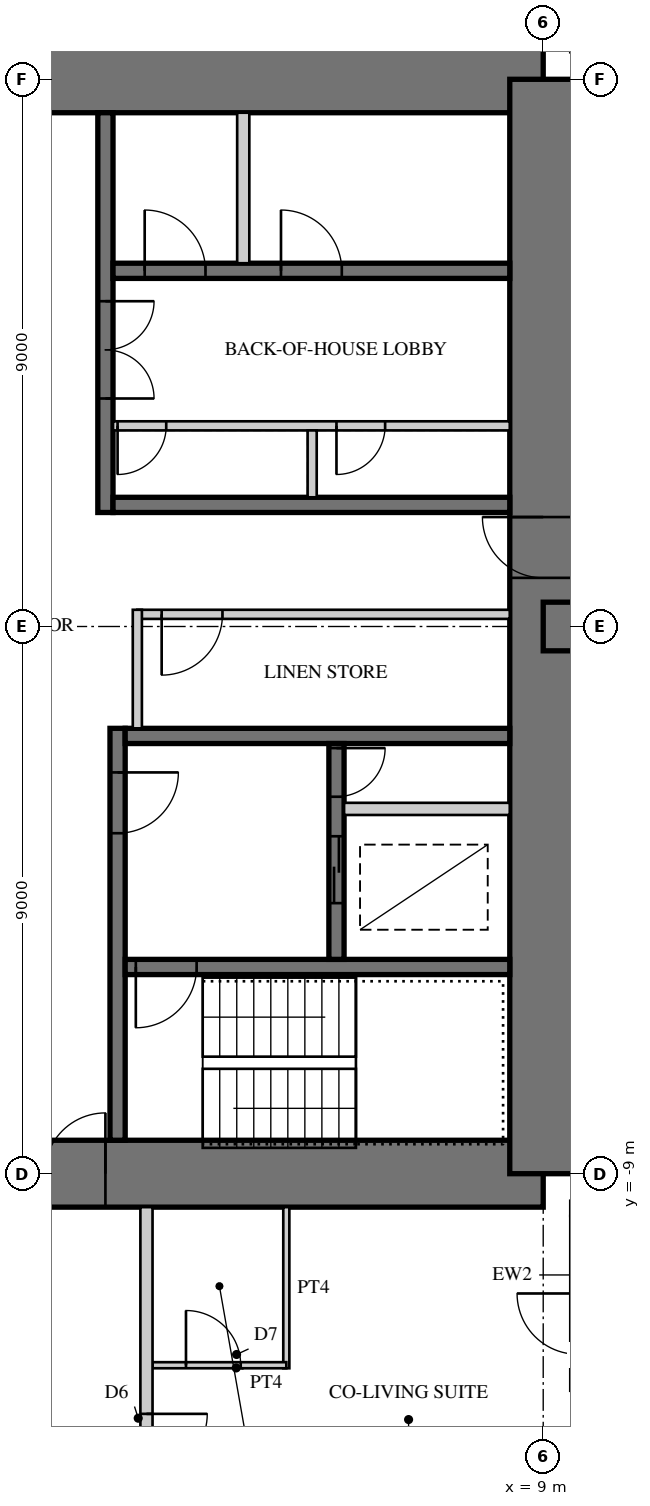
"""IFC4 building model, lengths in metres.
Left out: names, types, materials, properties, quantities, classifications, styles, units other than length and angle.
Written with IfcOpenShell. Run it as: python <this file> out.ifc"""

import sys

from ifc_helpers import new_model, si_unit, direction, frame, frame_2d, origin, place, context, subcontext, project, spatial, rectangle, extrude, element, fill, save


model = new_model("IFC4")
c1 = context("Model", 3, precision=1e-05, world=origin(), true_north=direction((0.0, 1.0)))
c2 = subcontext(c1, "Body", "Model", "MODEL_VIEW")
j1 = project(units=[si_unit("LENGTHUNIT", "METRE"), si_unit("PLANEANGLEUNIT", "RADIAN")], contexts=[c1])
p1 = place(None, origin())
s1 = spatial("IfcSite", under=j1, at=p1, CompositionType="ELEMENT")
p2 = place(p1, origin())
s2 = spatial("IfcBuilding", under=s1, at=p2, CompositionType="ELEMENT")
p3 = place(p2, frame((0.0, 0.0, 200.1)))
s3 = spatial("IfcBuildingStorey", under=s2, at=p3, CompositionType="ELEMENT", Elevation=200.1)
p4 = place(p3, frame((9.0, 9.0, 0.0), z_axis=(0.0, 0.0, 1.0), x_axis=(-1.0, 0.0, 0.0)))
e1 = element("IfcWall", 1, at=p4, inside=s3, PredefinedType="SHEAR", context=c2, shape_type="SweptSolid", body=[
    extrude(rectangle(XDim=18.0, YDim=1.1, at=frame_2d((9.0, 0.0))), origin(), (0.0, 0.0, 1.0), 3.4),
])
p5 = place(p4, frame((9.8, 0.0, 0.0)))
e2 = element("IfcOpeningElement", 2, at=p5, cuts=e1, PredefinedType="OPENING", context=c2, shape_type="SweptSolid", body=[
    extrude(rectangle(XDim=1.0, YDim=2.4, at=frame_2d((0.5, 1.2))), frame((0.0, 0.56, 0.0), z_axis=(0.0, -1.0, 0.0), x_axis=(1.0, 0.0, 0.0)), (0.0, 0.0, 1.0), 1.12),
])
p6 = place(p3, frame((-9.0, -9.0, 0.0), z_axis=(0.0, 0.0, 1.0), x_axis=(1.0, 0.0, 0.0)))
e3 = element("IfcWall", 3, at=p6, inside=s3, PredefinedType="SHEAR", context=c2, shape_type="SweptSolid", body=[
    extrude(rectangle(XDim=18.0, YDim=1.1, at=frame_2d((9.0, 0.0))), origin(), (0.0, 0.0, 1.0), 3.4),
])
p7 = place(p6, frame((9.8, 0.0, 0.0)))
e4 = element("IfcOpeningElement", 4, at=p7, cuts=e3, PredefinedType="OPENING", context=c2, shape_type="SweptSolid", body=[
    extrude(rectangle(XDim=1.0, YDim=2.4, at=frame_2d((0.5, 1.2))), frame((0.0, 0.56, 0.0), z_axis=(0.0, -1.0, 0.0), x_axis=(1.0, 0.0, 0.0)), (0.0, 0.0, 1.0), 1.12),
])
p8 = place(p3, frame((9.0, -9.0, 0.0), z_axis=(0.0, 0.0, 1.0), x_axis=(0.0, 1.0, 0.0)))
e5 = element("IfcWall", 5, at=p8, inside=s3, PredefinedType="SHEAR", context=c2, shape_type="SweptSolid", body=[
    extrude(rectangle(XDim=18.0, YDim=1.1, at=frame_2d((9.0, 0.0))), origin(), (0.0, 0.0, 1.0), 3.4),
])
p9 = place(p8, frame((9.8, 0.0, 0.0)))
e6 = element("IfcOpeningElement", 6, at=p9, cuts=e5, PredefinedType="OPENING", context=c2, shape_type="SweptSolid", body=[
    extrude(rectangle(XDim=1.0, YDim=2.4, at=frame_2d((0.5, 1.2))), frame((0.0, 0.56, 0.0), z_axis=(0.0, -1.0, 0.0), x_axis=(1.0, 0.0, 0.0)), (0.0, 0.0, 1.0), 1.12),
])
p10 = place(p3, frame((1.8, 1.875, 0.0), z_axis=(0.0, 0.0, 1.0), x_axis=(0.0, 1.0, 0.0)))
e7 = element("IfcWall", 7, at=p10, inside=s3, PredefinedType="SHEAR", context=c2, shape_type="SweptSolid", body=[
    extrude(rectangle(XDim=6.575, YDim=0.25, at=frame_2d((3.288, 0.0))), origin(), (0.0, 0.0, 1.0), 3.4),
])
p11 = place(p10, frame((1.875, 0.0, 0.0)))
e8 = element("IfcOpeningElement", 8, at=p11, cuts=e7, PredefinedType="OPENING", context=c2, shape_type="SweptSolid", body=[
    extrude(rectangle(XDim=1.6, YDim=2.4, at=frame_2d((0.8, 1.2))), frame((0.0, 0.135, 0.0), z_axis=(0.0, -1.0, 0.0), x_axis=(1.0, 0.0, 0.0)), (0.0, 0.0, 1.0), 0.27),
])
p12 = place(p3, frame((1.925, 2.0, 0.0), z_axis=(0.0, 0.0, 1.0), x_axis=(1.0, 0.0, 0.0)))
e9 = element("IfcWall", 9, at=p12, inside=s3, PredefinedType="SHEAR", context=c2, shape_type="SweptSolid", body=[
    extrude(rectangle(XDim=6.525, YDim=0.25, at=frame_2d((3.262, 0.0))), origin(), (0.0, 0.0, 1.0), 3.4),
])
p13 = place(p3, frame((1.925, 5.85, 0.0), z_axis=(0.0, 0.0, 1.0), x_axis=(1.0, 0.0, 0.0)))
e10 = element("IfcWall", 10, at=p13, inside=s3, PredefinedType="SHEAR", context=c2, shape_type="SweptSolid", body=[
    extrude(rectangle(XDim=6.525, YDim=0.25, at=frame_2d((3.262, 0.0))), origin(), (0.0, 0.0, 1.0), 3.4),
])
p14 = place(p13, frame((0.521, 0.0, 0.0)))
e11 = element("IfcOpeningElement", 11, at=p14, cuts=e10, PredefinedType="OPENING", context=c2, shape_type="SweptSolid", body=[
    extrude(rectangle(XDim=1.0, YDim=2.1, at=frame_2d((0.5, 1.05))), frame((0.0, 0.135, 0.0), z_axis=(0.0, -1.0, 0.0), x_axis=(1.0, 0.0, 0.0)), (0.0, 0.0, 1.0), 0.27),
])
p15 = place(p13, frame((2.762, 0.0, 0.0)))
e12 = element("IfcOpeningElement", 12, at=p15, cuts=e10, PredefinedType="OPENING", context=c2, shape_type="SweptSolid", body=[
    extrude(rectangle(XDim=1.0, YDim=2.1, at=frame_2d((0.5, 1.05))), frame((0.0, 0.135, 0.0), z_axis=(0.0, -1.0, 0.0), x_axis=(1.0, 0.0, 0.0)), (0.0, 0.0, 1.0), 0.27),
])
p16 = place(p3, frame((1.925, 3.3, 0.0), z_axis=(0.0, 0.0, 1.0), x_axis=(1.0, 0.0, 0.0)))
e13 = element("IfcWall", 13, at=p16, inside=s3, PredefinedType="PARTITIONING", context=c2, shape_type="SweptSolid", body=[
    extrude(rectangle(XDim=6.525, YDim=0.15, at=frame_2d((3.262, 0.0))), origin(), (0.0, 0.0, 1.0), 3.4),
])
p17 = place(p16, frame((0.075, 0.0, 0.0)))
e14 = element("IfcOpeningElement", 14, at=p17, cuts=e13, PredefinedType="OPENING", context=c2, shape_type="SweptSolid", body=[
    extrude(rectangle(XDim=0.8, YDim=2.1, at=frame_2d((0.4, 1.05))), frame((0.0, 0.085, 0.0), z_axis=(0.0, -1.0, 0.0), x_axis=(1.0, 0.0, 0.0)), (0.0, 0.0, 1.0), 0.17),
])
p18 = place(p16, frame((3.675, 0.0, 0.0)))
e15 = element("IfcOpeningElement", 15, at=p18, cuts=e13, PredefinedType="OPENING", context=c2, shape_type="SweptSolid", body=[
    extrude(rectangle(XDim=0.8, YDim=2.1, at=frame_2d((0.4, 1.05))), frame((0.0, 0.085, 0.0), z_axis=(0.0, -1.0, 0.0), x_axis=(1.0, 0.0, 0.0)), (0.0, 0.0, 1.0), 0.17),
])
p19 = place(p3, frame((5.2, 2.125, 0.0), z_axis=(0.0, 0.0, 1.0), x_axis=(0.0, 1.0, 0.0)))
e16 = element("IfcWall", 16, at=p19, inside=s3, PredefinedType="PARTITIONING", context=c2, shape_type="SweptSolid", body=[
    extrude(rectangle(XDim=1.1, YDim=0.15, at=frame_2d((0.55, 0.0))), origin(), (0.0, 0.0, 1.0), 3.4),
])
p20 = place(p3, frame((4.067, 5.975, 0.0), z_axis=(0.0, 0.0, 1.0), x_axis=(0.0, 1.0, 0.0)))
e17 = element("IfcWall", 17, at=p20, inside=s3, PredefinedType="PARTITIONING", context=c2, shape_type="SweptSolid", body=[
    extrude(rectangle(XDim=2.475, YDim=0.2, at=frame_2d((1.237, 0.0))), origin(), (0.0, 0.0, 1.0), 3.4),
])
p21 = place(p3, frame((2.0, -1.675, 0.0), z_axis=(0.0, 0.0, 1.0), x_axis=(0.0, -1.0, 0.0)))
e18 = element("IfcWall", 18, at=p21, inside=s3, PredefinedType="SHEAR", context=c2, shape_type="SweptSolid", body=[
    extrude(rectangle(XDim=6.775, YDim=0.25, at=frame_2d((3.387, 0.0))), origin(), (0.0, 0.0, 1.0), 3.4),
])
p22 = place(p21, frame((0.725, 0.0, 0.0)))
e19 = element("IfcOpeningElement", 19, at=p22, cuts=e18, PredefinedType="OPENING", context=c2, shape_type="SweptSolid", body=[
    extrude(rectangle(XDim=1.0, YDim=2.1, at=frame_2d((0.5, 1.05))), frame((0.0, 0.135, 0.0), z_axis=(0.0, -1.0, 0.0), x_axis=(1.0, 0.0, 0.0)), (0.0, 0.0, 1.0), 0.27),
])
p23 = place(p3, frame((2.125, -1.8, 0.0), z_axis=(0.0, 0.0, 1.0), x_axis=(1.0, 0.0, 0.0)))
e20 = element("IfcWall", 20, at=p23, inside=s3, PredefinedType="SHEAR", context=c2, shape_type="SweptSolid", body=[
    extrude(rectangle(XDim=6.325, YDim=0.25, at=frame_2d((3.163, 0.0))), origin(), (0.0, 0.0, 1.0), 3.4),
])
p24 = place(p3, frame((2.125, -5.6, 0.0), z_axis=(0.0, 0.0, 1.0), x_axis=(1.0, 0.0, 0.0)))
e21 = element("IfcWall", 21, at=p24, inside=s3, PredefinedType="SHEAR", context=c2, shape_type="SweptSolid", body=[
    extrude(rectangle(XDim=6.325, YDim=0.25, at=frame_2d((3.163, 0.0))), origin(), (0.0, 0.0, 1.0), 3.4),
])
p25 = place(p24, frame((0.175, 0.0, 0.0)))
e22 = element("IfcOpeningElement", 22, at=p25, cuts=e21, PredefinedType="OPENING", context=c2, shape_type="SweptSolid", body=[
    extrude(rectangle(XDim=1.0, YDim=2.1, at=frame_2d((0.5, 1.05))), frame((0.0, 0.135, 0.0), z_axis=(0.0, -1.0, 0.0), x_axis=(1.0, 0.0, 0.0)), (0.0, 0.0, 1.0), 0.27),
])
p26 = place(p3, frame((5.6, -1.925, 0.0), z_axis=(0.0, 0.0, 1.0), x_axis=(0.0, -1.0, 0.0)))
e23 = element("IfcWall", 23, at=p26, inside=s3, PredefinedType="SHEAR", context=c2, shape_type="SweptSolid", body=[
    extrude(rectangle(XDim=3.55, YDim=0.25, at=frame_2d((1.775, 0.0))), origin(), (0.0, 0.0, 1.0), 3.4),
])
p27 = place(p26, frame((1.525, 0.0, 0.0)))
e24 = element("IfcOpeningElement", 24, at=p27, cuts=e23, PredefinedType="OPENING", context=c2, shape_type="SweptSolid", body=[
    extrude(rectangle(XDim=1.1, YDim=2.2, at=frame_2d((0.55, 1.1))), frame((0.0, 0.135, 0.0), z_axis=(0.0, -1.0, 0.0), x_axis=(1.0, 0.0, 0.0)), (0.0, 0.0, 1.0), 0.27),
])
p28 = place(p26, frame((0.075, 0.0, 0.0)))
e25 = element("IfcOpeningElement", 25, at=p28, cuts=e23, PredefinedType="OPENING", context=c2, shape_type="SweptSolid", body=[
    extrude(rectangle(XDim=0.8, YDim=2.1, at=frame_2d((0.4, 1.05))), frame((0.0, 0.135, 0.0), z_axis=(0.0, -1.0, 0.0), x_axis=(1.0, 0.0, 0.0)), (0.0, 0.0, 1.0), 0.27),
])
p29 = place(p3, frame((5.725, -3.0, 0.0), z_axis=(0.0, 0.0, 1.0), x_axis=(1.0, 0.0, 0.0)))
e26 = element("IfcWall", 26, at=p29, inside=s3, PredefinedType="PARTITIONING", context=c2, shape_type="SweptSolid", body=[
    extrude(rectangle(XDim=2.725, YDim=0.2, at=frame_2d((1.362, 0.0))), origin(), (0.0, 0.0, 1.0), 3.4),
])
p30 = place(p3, frame((9.0, 0.0, 0.0), z_axis=(0.0, 0.0, 1.0), x_axis=(1.0, 0.0, 0.0)))
e27 = element("IfcWall", 27, at=p30, inside=s3, PredefinedType="SHEAR", context=c2, shape_type="SweptSolid", body=[
    extrude(rectangle(XDim=9.0, YDim=0.8, at=frame_2d((4.5, 0.0))), origin(), (0.0, 0.0, 1.0), 3.4),
])
p31 = place(p30, frame((3.95, 0.0, 0.0)))
e28 = element("IfcOpeningElement", 28, at=p31, cuts=e27, PredefinedType="OPENING", context=c2, shape_type="SweptSolid", body=[
    extrude(rectangle(XDim=1.0, YDim=2.15, at=frame_2d((0.5, 1.075))), frame((0.0, 0.41, 0.0), z_axis=(0.0, -1.0, 0.0), x_axis=(1.0, 0.0, 0.0)), (0.0, 0.0, 1.0), 0.82),
])
p32 = place(p30, frame((7.0, 0.0, 0.0)))
e29 = element("IfcOpeningElement", 29, at=p32, cuts=e27, PredefinedType="OPENING", context=c2, shape_type="SweptSolid", body=[
    extrude(rectangle(XDim=1.0, YDim=2.2, at=frame_2d((0.5, 1.1))), frame((0.0, 0.41, 0.0), z_axis=(0.0, -1.0, 0.0), x_axis=(1.0, 0.0, 0.0)), (0.0, 0.0, 1.0), 0.82),
])
p33 = place(p3, frame((9.445, -9.57, 0.0), z_axis=(0.0, 0.0, 1.0), x_axis=(1.0, 0.0, 0.0)))
e30 = element("IfcWall", 30, at=p33, inside=s3, PredefinedType="SOLIDWALL", context=c2, shape_type="SweptSolid", body=[
    extrude(rectangle(XDim=3.125, YDim=0.25, at=frame_2d((1.562, 0.0))), origin(), (0.0, 0.0, 1.0), 3.22),
])
p34 = place(p33, frame((0.6, 0.0, 0.0)))
e31 = element("IfcOpeningElement", 31, at=p34, cuts=e30, PredefinedType="OPENING", context=c2, shape_type="SweptSolid", body=[
    extrude(rectangle(XDim=1.0, YDim=2.2, at=frame_2d((0.5, 1.1))), frame((0.0, 0.135, 0.0), z_axis=(0.0, -1.0, 0.0), x_axis=(1.0, 0.0, 0.0)), (0.0, 0.0, 1.0), 0.27),
])
p35 = place(p3, frame((9.57, 9.445, 0.0), z_axis=(0.0, 0.0, 1.0), x_axis=(0.0, 1.0, 0.0)))
e32 = element("IfcWall", 32, at=p35, inside=s3, PredefinedType="SOLIDWALL", context=c2, shape_type="SweptSolid", body=[
    extrude(rectangle(XDim=3.125, YDim=0.25, at=frame_2d((1.562, 0.0))), origin(), (0.0, 0.0, 1.0), 3.22),
])
p36 = place(p35, frame((0.6, 0.0, 0.0)))
e33 = element("IfcOpeningElement", 33, at=p36, cuts=e32, PredefinedType="OPENING", context=c2, shape_type="SweptSolid", body=[
    extrude(rectangle(XDim=1.0, YDim=2.2, at=frame_2d((0.5, 1.1))), frame((0.0, 0.135, 0.0), z_axis=(0.0, -1.0, 0.0), x_axis=(1.0, 0.0, 0.0)), (0.0, 0.0, 1.0), 0.27),
])
p37 = place(p3, frame((9.57, -12.57, 0.0), z_axis=(0.0, 0.0, 1.0), x_axis=(0.0, 1.0, 0.0)))
e34 = element("IfcWall", 34, at=p37, inside=s3, PredefinedType="SOLIDWALL", context=c2, shape_type="SweptSolid", body=[
    extrude(rectangle(XDim=2.875, YDim=0.25, at=frame_2d((1.438, 0.0))), origin(), (0.0, 0.0, 1.0), 3.22),
])
p38 = place(p37, frame((0.6, 0.0, 0.0)))
e35 = element("IfcOpeningElement", 35, at=p38, cuts=e34, PredefinedType="OPENING", context=c2, shape_type="SweptSolid", body=[
    extrude(rectangle(XDim=1.0, YDim=2.2, at=frame_2d((0.5, 1.1))), frame((0.0, 0.135, 0.0), z_axis=(0.0, -1.0, 0.0), x_axis=(1.0, 0.0, 0.0)), (0.0, 0.0, 1.0), 0.27),
])
p39 = place(p3, frame((2.325, 0.2, 0.0), z_axis=(0.0, 0.0, 1.0), x_axis=(1.0, 0.0, 0.0)))
e36 = element("IfcWall", 36, at=p39, inside=s3, PredefinedType="PARTITIONING", context=c2, shape_type="SweptSolid", body=[
    extrude(rectangle(XDim=6.125, YDim=0.15, at=frame_2d((3.062, 0.0))), origin(), (0.0, 0.0, 1.0), 3.22),
])
p40 = place(p39, frame((0.4, 0.0, 0.0)))
e37 = element("IfcOpeningElement", 37, at=p40, cuts=e36, PredefinedType="OPENING", context=c2, shape_type="SweptSolid", body=[
    extrude(rectangle(XDim=1.0, YDim=2.1, at=frame_2d((0.5, 1.05))), frame((0.0, 0.085, 0.0), z_axis=(0.0, -1.0, 0.0), x_axis=(1.0, 0.0, 0.0)), (0.0, 0.0, 1.0), 0.17),
])
p41 = place(p3, frame((2.325, -1.675, 0.0), z_axis=(0.0, 0.0, 1.0), x_axis=(0.0, 1.0, 0.0)))
e38 = element("IfcWall", 38, at=p41, inside=s3, PredefinedType="PARTITIONING", context=c2, shape_type="SweptSolid", body=[
    extrude(rectangle(XDim=1.95, YDim=0.15, at=frame_2d((0.975, 0.0))), origin(), (0.0, 0.0, 1.0), 3.22),
])
p42 = place(p3, frame((4.775, -9.55, 0.0), z_axis=(0.0, 0.0, 1.0), x_axis=(0.0, -1.0, 0.0)))
e39 = element("IfcWall", 39, at=p42, inside=s3, PredefinedType="PARTITIONING", context=c2, shape_type="SweptSolid", body=[
    extrude(rectangle(XDim=2.65, YDim=0.1, at=frame_2d((1.325, 0.0))), origin(), (0.0, 0.0, 1.0), 3.22),
])
p43 = place(p3, frame((2.575, -12.15, 0.0), z_axis=(0.0, 0.0, 1.0), x_axis=(1.0, 0.0, 0.0)))
e40 = element("IfcWall", 40, at=p43, inside=s3, PredefinedType="PARTITIONING", context=c2, shape_type="SweptSolid", body=[
    extrude(rectangle(XDim=2.2, YDim=0.1, at=frame_2d((1.1, 0.0))), origin(), (0.0, 0.0, 1.0), 3.22),
])
p44 = place(p43, frame((0.55, 0.0, 0.0)))
e41 = element("IfcOpeningElement", 41, at=p44, cuts=e40, PredefinedType="OPENING", context=c2, shape_type="SweptSolid", body=[
    extrude(rectangle(XDim=0.9, YDim=2.1, at=frame_2d((0.45, 1.05))), frame((0.0, 0.06, 0.0), z_axis=(0.0, -1.0, 0.0), x_axis=(1.0, 0.0, 0.0)), (0.0, 0.0, 1.0), 0.12),
])
p45 = place(p3, frame((2.475, -9.55, 0.0), z_axis=(0.0, 0.0, 1.0), x_axis=(0.0, -1.0, 0.0)))
e42 = element("IfcWall", 42, at=p45, inside=s3, PredefinedType="SOLIDWALL", context=c2, shape_type="SweptSolid", body=[
    extrude(rectangle(XDim=11.45, YDim=0.2, at=frame_2d((5.725, 0.0))), origin(), (0.0, 0.0, 1.0), 3.22),
])
p46 = place(p45, frame((3.4, 0.0, 0.0)))
e43 = element("IfcOpeningElement", 43, at=p46, cuts=e42, PredefinedType="OPENING", context=c2, shape_type="SweptSolid", body=[
    extrude(rectangle(XDim=1.0, YDim=2.15, at=frame_2d((0.5, 1.075))), frame((0.0, 0.11, 0.0), z_axis=(0.0, -1.0, 0.0), x_axis=(1.0, 0.0, 0.0)), (0.0, 0.0, 1.0), 0.22),
])
p47 = place(p40, frame((1.0, 0.0, 0.0), z_axis=(0.0, 0.0, 1.0), x_axis=(-1.0, 0.0, 0.0)))
e44 = element("IfcDoor", 44, at=p47, inside=s3, OperationType="SINGLE_SWING_RIGHT", PredefinedType="DOOR", context=c2, shape_type="SweptSolid", body=[
    extrude(rectangle(XDim=1.0, YDim=2.1, at=frame_2d((0.5, 1.05))), frame((0.0, 0.025, 0.0), z_axis=(0.0, -1.0, 0.0), x_axis=(1.0, 0.0, 0.0)), (0.0, 0.0, 1.0), 0.05),
])
fill(e37, e44)
p48 = place(p44, origin())
e45 = element("IfcDoor", 45, at=p48, inside=s3, OperationType="SINGLE_SWING_LEFT", PredefinedType="DOOR", context=c2, shape_type="SweptSolid", body=[
    extrude(rectangle(XDim=0.9, YDim=2.1, at=frame_2d((0.45, 1.05))), frame((0.0, 0.025, 0.0), z_axis=(0.0, -1.0, 0.0), x_axis=(1.0, 0.0, 0.0)), (0.0, 0.0, 1.0), 0.05),
])
fill(e41, e45)
p49 = place(p46, origin())
e46 = element("IfcDoor", 46, at=p49, inside=s3, OperationType="SINGLE_SWING_LEFT", PredefinedType="DOOR", context=c2, shape_type="SweptSolid", body=[
    extrude(rectangle(XDim=1.0, YDim=2.15, at=frame_2d((0.5, 1.075))), frame((0.0, 0.025, 0.0), z_axis=(0.0, -1.0, 0.0), x_axis=(1.0, 0.0, 0.0)), (0.0, 0.0, 1.0), 0.05),
])
fill(e43, e46)
p50 = place(p7, origin())
e47 = element("IfcDoor", 47, at=p50, inside=s3, OperationType="SINGLE_SWING_RIGHT", PredefinedType="DOOR", context=c2, shape_type="SweptSolid", body=[
    extrude(rectangle(XDim=1.0, YDim=2.4, at=frame_2d((0.5, 1.2))), frame((0.0, 0.055, 0.0), z_axis=(0.0, -1.0, 0.0), x_axis=(1.0, 0.0, 0.0)), (0.0, 0.0, 1.0), 0.05),
])
fill(e4, e47)
p51 = place(p9, origin())
e48 = element("IfcDoor", 48, at=p51, inside=s3, OperationType="SINGLE_SWING_RIGHT", PredefinedType="DOOR", context=c2, shape_type="SweptSolid", body=[
    extrude(rectangle(XDim=1.0, YDim=2.4, at=frame_2d((0.5, 1.2))), frame((0.0, 0.055, 0.0), z_axis=(0.0, -1.0, 0.0), x_axis=(1.0, 0.0, 0.0)), (0.0, 0.0, 1.0), 0.05),
])
fill(e6, e48)
p52 = place(p11, frame((1.6, 0.0, 0.0), z_axis=(0.0, 0.0, 1.0), x_axis=(-1.0, 0.0, 0.0)))
e49 = element("IfcDoor", 49, at=p52, inside=s3, OperationType="DOUBLE_DOOR_SINGLE_SWING", PredefinedType="DOOR", context=c2, shape_type="SweptSolid", body=[
    extrude(rectangle(XDim=1.6, YDim=2.4, at=frame_2d((0.8, 1.2))), frame((0.0, 0.025, 0.0), z_axis=(0.0, -1.0, 0.0), x_axis=(1.0, 0.0, 0.0)), (0.0, 0.0, 1.0), 0.05),
])
fill(e8, e49)
p53 = place(p17, frame((0.8, 0.0, 0.0), z_axis=(0.0, 0.0, 1.0), x_axis=(-1.0, 0.0, 0.0)))
e50 = element("IfcDoor", 50, at=p53, inside=s3, OperationType="SINGLE_SWING_RIGHT", PredefinedType="DOOR", context=c2, shape_type="SweptSolid", body=[
    extrude(rectangle(XDim=0.8, YDim=2.1, at=frame_2d((0.4, 1.05))), frame((0.0, 0.025, 0.0), z_axis=(0.0, -1.0, 0.0), x_axis=(1.0, 0.0, 0.0)), (0.0, 0.0, 1.0), 0.05),
])
fill(e14, e50)
p54 = place(p18, frame((0.8, 0.0, 0.0), z_axis=(0.0, 0.0, 1.0), x_axis=(-1.0, 0.0, 0.0)))
e51 = element("IfcDoor", 51, at=p54, inside=s3, OperationType="SINGLE_SWING_RIGHT", PredefinedType="DOOR", context=c2, shape_type="SweptSolid", body=[
    extrude(rectangle(XDim=0.8, YDim=2.1, at=frame_2d((0.4, 1.05))), frame((0.0, 0.025, 0.0), z_axis=(0.0, -1.0, 0.0), x_axis=(1.0, 0.0, 0.0)), (0.0, 0.0, 1.0), 0.05),
])
fill(e15, e51)
p55 = place(p22, origin())
e52 = element("IfcDoor", 52, at=p55, inside=s3, OperationType="SINGLE_SWING_LEFT", PredefinedType="DOOR", context=c2, shape_type="SweptSolid", body=[
    extrude(rectangle(XDim=1.0, YDim=2.1, at=frame_2d((0.5, 1.05))), frame((0.0, 0.025, 0.0), z_axis=(0.0, -1.0, 0.0), x_axis=(1.0, 0.0, 0.0)), (0.0, 0.0, 1.0), 0.05),
])
fill(e19, e52)
p56 = place(p25, frame((1.0, 0.0, 0.0), z_axis=(0.0, 0.0, 1.0), x_axis=(-1.0, 0.0, 0.0)))
e53 = element("IfcDoor", 53, at=p56, inside=s3, OperationType="SINGLE_SWING_RIGHT", PredefinedType="DOOR", context=c2, shape_type="SweptSolid", body=[
    extrude(rectangle(XDim=1.0, YDim=2.1, at=frame_2d((0.5, 1.05))), frame((0.0, 0.025, 0.0), z_axis=(0.0, -1.0, 0.0), x_axis=(1.0, 0.0, 0.0)), (0.0, 0.0, 1.0), 0.05),
])
fill(e22, e53)
p57 = place(p27, origin())
e54 = element("IfcDoor", 54, at=p57, inside=s3, OperationType="DOUBLE_DOOR_SLIDING", PredefinedType="DOOR", context=c2, shape_type="SweptSolid", body=[
    extrude(rectangle(XDim=1.1, YDim=2.2, at=frame_2d((0.55, 1.1))), frame((0.0, 0.025, 0.0), z_axis=(0.0, -1.0, 0.0), x_axis=(1.0, 0.0, 0.0)), (0.0, 0.0, 1.0), 0.05),
])
fill(e24, e54)
p58 = place(p28, origin())
e55 = element("IfcDoor", 55, at=p58, inside=s3, OperationType="SINGLE_SWING_LEFT", PredefinedType="DOOR", context=c2, shape_type="SweptSolid", body=[
    extrude(rectangle(XDim=0.8, YDim=2.1, at=frame_2d((0.4, 1.05))), frame((0.0, 0.025, 0.0), z_axis=(0.0, -1.0, 0.0), x_axis=(1.0, 0.0, 0.0)), (0.0, 0.0, 1.0), 0.05),
])
fill(e25, e55)
p59 = place(p14, origin())
e56 = element("IfcDoor", 56, at=p59, inside=s3, OperationType="SINGLE_SWING_LEFT", PredefinedType="DOOR", context=c2, shape_type="SweptSolid", body=[
    extrude(rectangle(XDim=1.0, YDim=2.1, at=frame_2d((0.5, 1.05))), frame((0.0, 0.025, 0.0), z_axis=(0.0, -1.0, 0.0), x_axis=(1.0, 0.0, 0.0)), (0.0, 0.0, 1.0), 0.05),
])
fill(e11, e56)
p60 = place(p15, origin())
e57 = element("IfcDoor", 57, at=p60, inside=s3, OperationType="SINGLE_SWING_LEFT", PredefinedType="DOOR", context=c2, shape_type="SweptSolid", body=[
    extrude(rectangle(XDim=1.0, YDim=2.1, at=frame_2d((0.5, 1.05))), frame((0.0, 0.025, 0.0), z_axis=(0.0, -1.0, 0.0), x_axis=(1.0, 0.0, 0.0)), (0.0, 0.0, 1.0), 0.05),
])
fill(e12, e57)
save(model, sys.argv[1])
